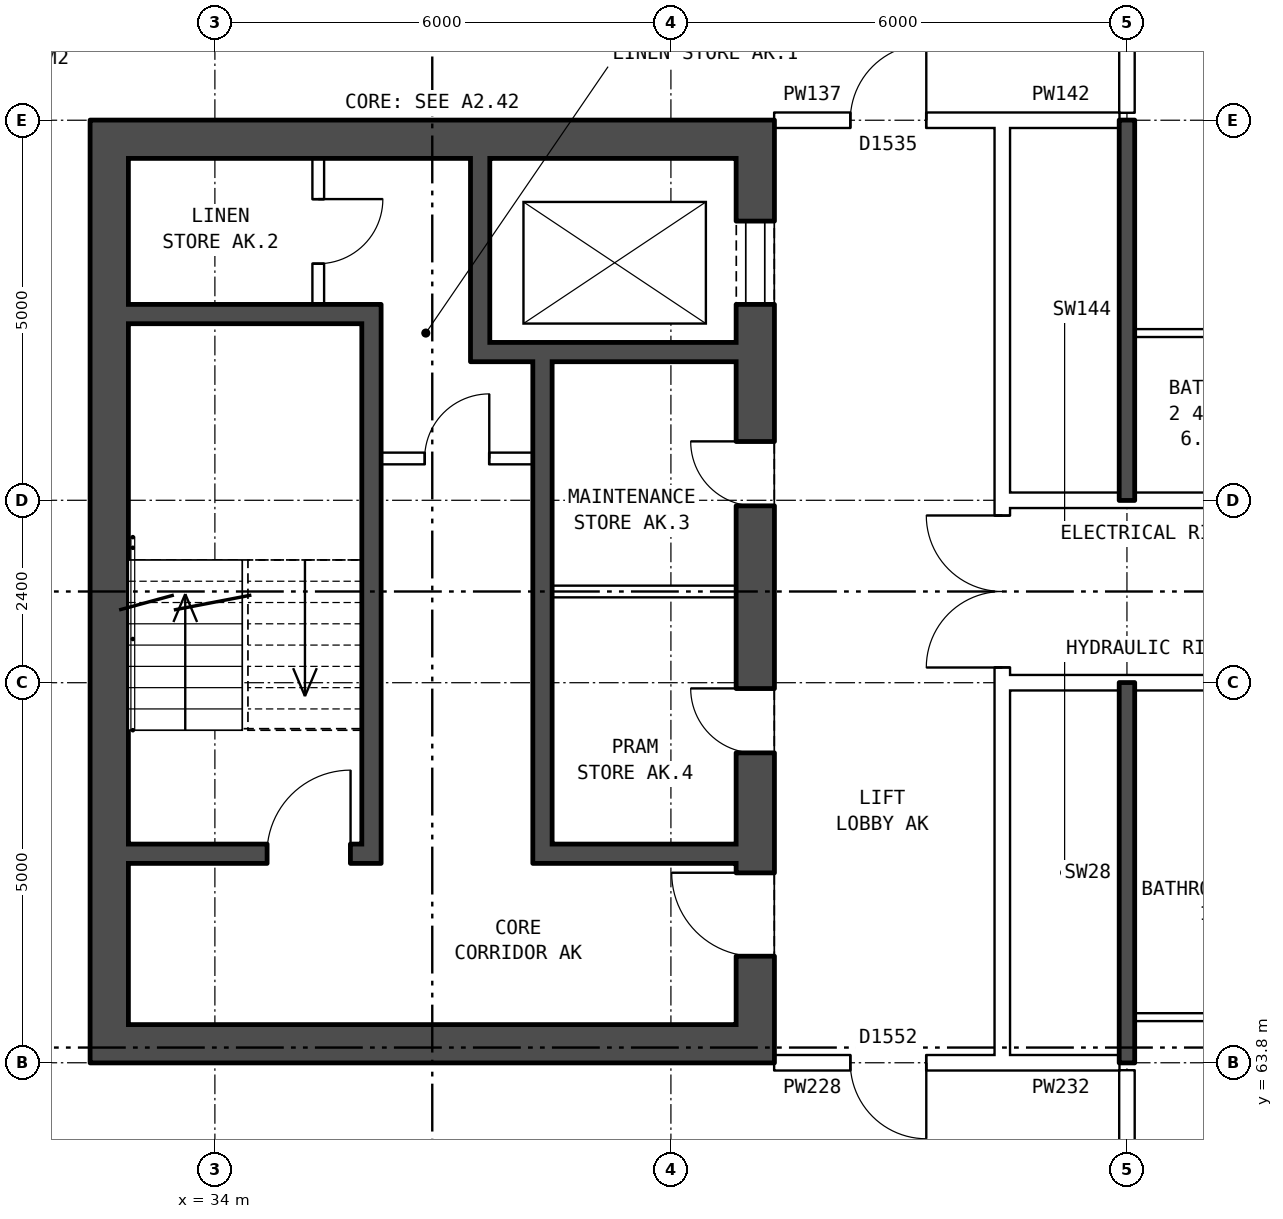
"""IFC4 building model, lengths in metres.
Left out: names, types, materials, properties, quantities, classifications, styles, units other than length and angle.
Written with IfcOpenShell. Run it as: python <this file> out.ifc"""

import sys

from ifc_helpers import new_model, si_unit, direction, frame, frame_2d, origin, place, context, subcontext, project, spatial, rectangle, extrude, element, fill, save


model = new_model("IFC4")
c1 = context("Model", 3, precision=1e-05, world=origin(), true_north=direction((0.0, 1.0)))
c2 = subcontext(c1, "Body", "Model", "MODEL_VIEW")
j1 = project(units=[si_unit("LENGTHUNIT", "METRE"), si_unit("PLANEANGLEUNIT", "RADIAN")], contexts=[c1])
p1 = place(None, origin())
s1 = spatial("IfcSite", under=j1, at=p1, CompositionType="ELEMENT")
p2 = place(p1, origin())
s2 = spatial("IfcBuilding", under=s1, at=p2, CompositionType="ELEMENT")
p3 = place(p2, frame((0.0, 0.0, 148.5)))
s3 = spatial("IfcBuildingStorey", under=s2, at=p3, CompositionType="ELEMENT", Elevation=148.5)
p4 = place(p3, frame((41.11, 76.2, 0.0), z_axis=(0.0, 0.0, 1.0), x_axis=(0.0, -1.0, 0.0)))
e1 = element("IfcWall", 1, at=p4, inside=s3, PredefinedType="SHEAR", context=c2, shape_type="SweptSolid", body=[
    extrude(rectangle(XDim=12.4, YDim=0.5, at=frame_2d((6.2, 0.0))), origin(), (0.0, 0.0, 1.0), 2.85),
])
p5 = place(p4, frame((1.325, 0.0, 0.0)))
e2 = element("IfcOpeningElement", 2, at=p5, cuts=e1, PredefinedType="OPENING", context=c2, shape_type="SweptSolid", body=[
    extrude(rectangle(XDim=1.1, YDim=2.1, at=frame_2d((0.55, 1.05))), frame((0.0, 0.26, 0.0), z_axis=(0.0, -1.0, 0.0), x_axis=(1.0, 0.0, 0.0)), (0.0, 0.0, 1.0), 0.52),
])
p6 = place(p4, frame((4.225, 0.0, 0.0)))
e3 = element("IfcOpeningElement", 3, at=p6, cuts=e1, PredefinedType="OPENING", context=c2, shape_type="SweptSolid", body=[
    extrude(rectangle(XDim=0.85, YDim=2.1, at=frame_2d((0.425, 1.05))), frame((0.0, 0.26, 0.0), z_axis=(0.0, -1.0, 0.0), x_axis=(1.0, 0.0, 0.0)), (0.0, 0.0, 1.0), 0.52),
])
p7 = place(p4, frame((7.475, 0.0, 0.0)))
e4 = element("IfcOpeningElement", 4, at=p7, cuts=e1, PredefinedType="OPENING", context=c2, shape_type="SweptSolid", body=[
    extrude(rectangle(XDim=0.85, YDim=2.1, at=frame_2d((0.425, 1.05))), frame((0.0, 0.26, 0.0), z_axis=(0.0, -1.0, 0.0), x_axis=(1.0, 0.0, 0.0)), (0.0, 0.0, 1.0), 0.52),
])
p8 = place(p4, frame((9.9, 0.0, 0.0)))
e5 = element("IfcOpeningElement", 5, at=p8, cuts=e1, PredefinedType="OPENING", context=c2, shape_type="SweptSolid", body=[
    extrude(rectangle(XDim=1.1, YDim=2.1, at=frame_2d((0.55, 1.05))), frame((0.0, 0.26, 0.0), z_axis=(0.0, -1.0, 0.0), x_axis=(1.0, 0.0, 0.0)), (0.0, 0.0, 1.0), 0.52),
])
p9 = place(p3, frame((32.61, 76.2, 0.0), z_axis=(0.0, 0.0, 1.0), x_axis=(0.0, -1.0, 0.0)))
e6 = element("IfcWall", 6, at=p9, inside=s3, PredefinedType="SHEAR", context=c2, shape_type="SweptSolid", body=[
    extrude(rectangle(XDim=12.4, YDim=0.5, at=frame_2d((6.2, 0.0))), origin(), (0.0, 0.0, 1.0), 2.85),
])
for number, where, z_axis, x_axis in (
    (7, (40.86, 75.95, 0.0), (0.0, 0.0, 1.0), (-1.0, 0.0, 0.0)),
    (8, (40.86, 64.05, 0.0), (0.0, 0.0, 1.0), (-1.0, 0.0, 0.0)),
):
    element("IfcWall", number, at=place(p3, frame(where, z_axis=z_axis, x_axis=x_axis)), inside=s3, PredefinedType="SHEAR", context=c2, shape_type="SweptSolid", body=[
        extrude(rectangle(XDim=8.0, YDim=0.5, at=frame_2d((4.0, 0.0))), origin(), (0.0, 0.0, 1.0), 2.85),
    ])
p10 = place(p3, frame((35.935, 73.65, 0.0), z_axis=(0.0, 0.0, 1.0), x_axis=(-1.0, 0.0, 0.0)))
e9 = element("IfcWall", 9, at=p10, inside=s3, PredefinedType="SHEAR", context=c2, shape_type="SweptSolid", body=[
    extrude(rectangle(XDim=3.075, YDim=0.25, at=frame_2d((1.538, 0.0))), origin(), (0.0, 0.0, 1.0), 2.85),
])
p11 = place(p3, frame((40.86, 73.15, 0.0), z_axis=(0.0, 0.0, 1.0), x_axis=(-1.0, 0.0, 0.0)))
e10 = element("IfcWall", 10, at=p11, inside=s3, PredefinedType="SHEAR", context=c2, shape_type="SweptSolid", body=[
    extrude(rectangle(XDim=3.495, YDim=0.25, at=frame_2d((1.748, 0.0))), origin(), (0.0, 0.0, 1.0), 2.85),
])
p12 = place(p3, frame((38.185, 71.75, 0.0), z_axis=(0.0, 0.0, 1.0), x_axis=(-1.0, 0.0, 0.0)))
e11 = element("IfcWall", 11, at=p12, inside=s3, PredefinedType="PARTITIONING", context=c2, shape_type="SweptSolid", body=[
    extrude(rectangle(XDim=2.0, YDim=0.15, at=frame_2d((1.0, 0.0))), origin(), (0.0, 0.0, 1.0), 2.85),
])
p13 = place(p12, frame((0.575, 0.0, 0.0)))
e12 = element("IfcOpeningElement", 12, at=p13, cuts=e11, PredefinedType="OPENING", context=c2, shape_type="SweptSolid", body=[
    extrude(rectangle(XDim=0.85, YDim=2.1, at=frame_2d((0.425, 1.05))), frame((0.0, 0.085, 0.0), z_axis=(0.0, -1.0, 0.0), x_axis=(1.0, 0.0, 0.0)), (0.0, 0.0, 1.0), 0.17),
])
p14 = place(p3, frame((40.86, 70.0, 0.0), z_axis=(0.0, 0.0, 1.0), x_axis=(-1.0, 0.0, 0.0)))
e13 = element("IfcWall", 13, at=p14, inside=s3, PredefinedType="PARTITIONING", context=c2, shape_type="SweptSolid", body=[
    extrude(rectangle(XDim=2.425, YDim=0.15, at=frame_2d((1.212, 0.0))), origin(), (0.0, 0.0, 1.0), 2.85),
])
p15 = place(p3, frame((40.86, 66.55, 0.0), z_axis=(0.0, 0.0, 1.0), x_axis=(-1.0, 0.0, 0.0)))
e14 = element("IfcWall", 14, at=p15, inside=s3, PredefinedType="SHEAR", context=c2, shape_type="SweptSolid", body=[
    extrude(rectangle(XDim=2.425, YDim=0.25, at=frame_2d((1.212, 0.0))), origin(), (0.0, 0.0, 1.0), 2.85),
])
p16 = place(p3, frame((35.935, 66.55, 0.0), z_axis=(0.0, 0.0, 1.0), x_axis=(-1.0, 0.0, 0.0)))
e15 = element("IfcWall", 15, at=p16, inside=s3, PredefinedType="SHEAR", context=c2, shape_type="SweptSolid", body=[
    extrude(rectangle(XDim=3.075, YDim=0.25, at=frame_2d((1.538, 0.0))), origin(), (0.0, 0.0, 1.0), 2.85),
])
p17 = place(p16, frame((0.15, 0.0, 0.0)))
e16 = element("IfcOpeningElement", 16, at=p17, cuts=e15, PredefinedType="OPENING", context=c2, shape_type="SweptSolid", body=[
    extrude(rectangle(XDim=1.1, YDim=2.1, at=frame_2d((0.55, 1.05))), frame((0.0, 0.135, 0.0), z_axis=(0.0, -1.0, 0.0), x_axis=(1.0, 0.0, 0.0)), (0.0, 0.0, 1.0), 0.27),
])
p18 = place(p3, frame((38.31, 73.025, 0.0), z_axis=(0.0, 0.0, 1.0), x_axis=(0.0, -1.0, 0.0)))
e17 = element("IfcWall", 17, at=p18, inside=s3, PredefinedType="SHEAR", context=c2, shape_type="SweptSolid", body=[
    extrude(rectangle(XDim=6.6, YDim=0.25, at=frame_2d((3.3, 0.0))), origin(), (0.0, 0.0, 1.0), 2.85),
])
p19 = place(p3, frame((37.49, 75.7, 0.0), z_axis=(0.0, 0.0, 1.0), x_axis=(0.0, -1.0, 0.0)))
e18 = element("IfcWall", 18, at=p19, inside=s3, PredefinedType="SHEAR", context=c2, shape_type="SweptSolid", body=[
    extrude(rectangle(XDim=2.425, YDim=0.25, at=frame_2d((1.212, 0.0))), origin(), (0.0, 0.0, 1.0), 2.85),
])
p20 = place(p3, frame((36.06, 73.775, 0.0), z_axis=(0.0, 0.0, 1.0), x_axis=(0.0, -1.0, 0.0)))
e19 = element("IfcWall", 19, at=p20, inside=s3, PredefinedType="SHEAR", context=c2, shape_type="SweptSolid", body=[
    extrude(rectangle(XDim=7.35, YDim=0.25, at=frame_2d((3.675, 0.0))), origin(), (0.0, 0.0, 1.0), 2.85),
])
p21 = place(p3, frame((35.36, 75.7, 0.0), z_axis=(0.0, 0.0, 1.0), x_axis=(0.0, -1.0, 0.0)))
e20 = element("IfcWall", 20, at=p21, inside=s3, PredefinedType="PARTITIONING", context=c2, shape_type="SweptSolid", body=[
    extrude(rectangle(XDim=1.925, YDim=0.15, at=frame_2d((0.962, 0.0))), origin(), (0.0, 0.0, 1.0), 2.85),
])
p22 = place(p21, frame((0.538, 0.0, 0.0)))
e21 = element("IfcOpeningElement", 21, at=p22, cuts=e20, PredefinedType="OPENING", context=c2, shape_type="SweptSolid", body=[
    extrude(rectangle(XDim=0.85, YDim=2.1, at=frame_2d((0.425, 1.05))), frame((0.0, 0.085, 0.0), z_axis=(0.0, -1.0, 0.0), x_axis=(1.0, 0.0, 0.0)), (0.0, 0.0, 1.0), 0.17),
])
p23 = place(p3, frame((44.36, 63.9, 0.0), z_axis=(0.0, 0.0, 1.0), x_axis=(0.0, 1.0, 0.0)))
e22 = element("IfcWall", 22, at=p23, inside=s3, PredefinedType="PARTITIONING", context=c2, shape_type="SweptSolid", body=[
    extrude(rectangle(XDim=12.2, YDim=0.2, at=frame_2d((6.1, 0.0))), origin(), (0.0, 0.0, 1.0), 2.85),
])
p24 = place(p23, frame((5.1, 0.0, 0.0)))
e23 = element("IfcOpeningElement", 23, at=p24, cuts=e22, PredefinedType="OPENING", context=c2, shape_type="SweptSolid", body=[
    extrude(rectangle(XDim=2.0, YDim=2.1, at=frame_2d((1.0, 1.05))), frame((0.0, 0.11, 0.0), z_axis=(0.0, -1.0, 0.0), x_axis=(1.0, 0.0, 0.0)), (0.0, 0.0, 1.0), 0.22),
])
p25 = place(p3, frame((41.36, 63.8, 0.0), z_axis=(0.0, 0.0, 1.0), x_axis=(1.0, 0.0, 0.0)))
e24 = element("IfcWall", 24, at=p25, inside=s3, PredefinedType="PARTITIONING", context=c2, shape_type="SweptSolid", body=[
    extrude(rectangle(XDim=3.0, YDim=0.2, at=frame_2d((1.5, 0.0))), origin(), (0.0, 0.0, 1.0), 2.85),
])
p26 = place(p25, frame((1.0, 0.0, 0.0)))
e25 = element("IfcOpeningElement", 25, at=p26, cuts=e24, PredefinedType="OPENING", context=c2, shape_type="SweptSolid", body=[
    extrude(rectangle(XDim=1.0, YDim=2.1, at=frame_2d((0.5, 1.05))), frame((0.0, 0.11, 0.0), z_axis=(0.0, -1.0, 0.0), x_axis=(1.0, 0.0, 0.0)), (0.0, 0.0, 1.0), 0.22),
])
p27 = place(p3, frame((44.36, 63.8, 0.0), z_axis=(0.0, 0.0, 1.0), x_axis=(1.0, 0.0, 0.0)))
e26 = element("IfcWall", 26, at=p27, inside=s3, PredefinedType="PARTITIONING", context=c2, shape_type="SweptSolid", body=[
    extrude(rectangle(XDim=1.54, YDim=0.2, at=frame_2d((0.77, 0.0))), origin(), (0.0, 0.0, 1.0), 2.85),
])
p28 = place(p3, frame((46.1, 64.4, 0.0), z_axis=(0.0, 0.0, 1.0), x_axis=(1.0, 0.0, 0.0)))
e27 = element("IfcWall", 27, at=p28, inside=s3, PredefinedType="PARTITIONING", context=c2, shape_type="SweptSolid", body=[
    extrude(rectangle(XDim=2.9, YDim=0.1, at=frame_2d((1.45, 0.0))), origin(), (0.0, 0.0, 1.0), 2.85),
])
p29 = place(p3, frame((44.36, 68.8, 0.0), z_axis=(0.0, 0.0, 1.0), x_axis=(1.0, 0.0, 0.0)))
e28 = element("IfcWall", 28, at=p29, inside=s3, PredefinedType="PARTITIONING", context=c2, shape_type="SweptSolid", body=[
    extrude(rectangle(XDim=19.28, YDim=0.2, at=frame_2d((9.64, 0.0))), origin(), (0.0, 0.0, 1.0), 2.85),
])
p30 = place(p29, frame((14.64, 0.0, 0.0)))
e29 = element("IfcOpeningElement", 29, at=p30, cuts=e28, PredefinedType="OPENING", context=c2, shape_type="SweptSolid", body=[
    extrude(rectangle(XDim=1.0, YDim=2.1, at=frame_2d((0.5, 1.05))), frame((0.0, 0.11, 0.0), z_axis=(0.0, -1.0, 0.0), x_axis=(1.0, 0.0, 0.0)), (0.0, 0.0, 1.0), 0.22),
])
p31 = place(p29, frame((5.64, 0.0, 0.0)))
e30 = element("IfcOpeningElement", 30, at=p31, cuts=e28, PredefinedType="OPENING", context=c2, shape_type="SweptSolid", body=[
    extrude(rectangle(XDim=1.0, YDim=2.1, at=frame_2d((0.5, 1.05))), frame((0.0, 0.11, 0.0), z_axis=(0.0, -1.0, 0.0), x_axis=(1.0, 0.0, 0.0)), (0.0, 0.0, 1.0), 0.22),
])
p32 = place(p3, frame((44.36, 71.2, 0.0), z_axis=(0.0, 0.0, 1.0), x_axis=(1.0, 0.0, 0.0)))
e31 = element("IfcWall", 31, at=p32, inside=s3, PredefinedType="PARTITIONING", context=c2, shape_type="SweptSolid", body=[
    extrude(rectangle(XDim=19.28, YDim=0.2, at=frame_2d((9.64, 0.0))), origin(), (0.0, 0.0, 1.0), 2.85),
])
p33 = place(p32, frame((14.64, 0.0, 0.0)))
e32 = element("IfcOpeningElement", 32, at=p33, cuts=e31, PredefinedType="OPENING", context=c2, shape_type="SweptSolid", body=[
    extrude(rectangle(XDim=1.0, YDim=2.1, at=frame_2d((0.5, 1.05))), frame((0.0, 0.11, 0.0), z_axis=(0.0, -1.0, 0.0), x_axis=(1.0, 0.0, 0.0)), (0.0, 0.0, 1.0), 0.22),
])
p34 = place(p32, frame((5.64, 0.0, 0.0)))
e33 = element("IfcOpeningElement", 33, at=p34, cuts=e31, PredefinedType="OPENING", context=c2, shape_type="SweptSolid", body=[
    extrude(rectangle(XDim=1.0, YDim=2.1, at=frame_2d((0.5, 1.05))), frame((0.0, 0.11, 0.0), z_axis=(0.0, -1.0, 0.0), x_axis=(1.0, 0.0, 0.0)), (0.0, 0.0, 1.0), 0.22),
])
p35 = place(p3, frame((46.1, 73.4, 0.0), z_axis=(0.0, 0.0, 1.0), x_axis=(1.0, 0.0, 0.0)))
e34 = element("IfcWall", 34, at=p35, inside=s3, PredefinedType="PARTITIONING", context=c2, shape_type="SweptSolid", body=[
    extrude(rectangle(XDim=2.9, YDim=0.1, at=frame_2d((1.45, 0.0))), origin(), (0.0, 0.0, 1.0), 2.85),
])
p36 = place(p3, frame((41.36, 76.2, 0.0), z_axis=(0.0, 0.0, 1.0), x_axis=(1.0, 0.0, 0.0)))
e35 = element("IfcWall", 35, at=p36, inside=s3, PredefinedType="PARTITIONING", context=c2, shape_type="SweptSolid", body=[
    extrude(rectangle(XDim=3.0, YDim=0.2, at=frame_2d((1.5, 0.0))), origin(), (0.0, 0.0, 1.0), 2.85),
])
p37 = place(p36, frame((1.0, 0.0, 0.0)))
e36 = element("IfcOpeningElement", 36, at=p37, cuts=e35, PredefinedType="OPENING", context=c2, shape_type="SweptSolid", body=[
    extrude(rectangle(XDim=1.0, YDim=2.1, at=frame_2d((0.5, 1.05))), frame((0.0, 0.11, 0.0), z_axis=(0.0, -1.0, 0.0), x_axis=(1.0, 0.0, 0.0)), (0.0, 0.0, 1.0), 0.22),
])
p38 = place(p3, frame((44.36, 76.2, 0.0), z_axis=(0.0, 0.0, 1.0), x_axis=(1.0, 0.0, 0.0)))
e37 = element("IfcWall", 37, at=p38, inside=s3, PredefinedType="PARTITIONING", context=c2, shape_type="SweptSolid", body=[
    extrude(rectangle(XDim=1.54, YDim=0.2, at=frame_2d((0.77, 0.0))), origin(), (0.0, 0.0, 1.0), 2.85),
])
p39 = place(p3, frame((46.0, 61.5, 0.0), z_axis=(0.0, 0.0, 1.0), x_axis=(0.0, 1.0, 0.0)))
e38 = element("IfcWall", 38, at=p39, inside=s3, PredefinedType="PARTITIONING", context=c2, shape_type="SweptSolid", body=[
    extrude(rectangle(XDim=2.2, YDim=0.2, at=frame_2d((1.1, 0.0))), origin(), (0.0, 0.0, 1.0), 2.85),
])
for number, where, z_axis, x_axis in (
    (39, (46.0, 63.8, 0.0), (0.0, 0.0, 1.0), (0.0, 1.0, 0.0)),
    (40, (46.0, 71.2, 0.0), (0.0, 0.0, 1.0), (0.0, 1.0, 0.0)),
):
    element("IfcWall", number, at=place(p3, frame(where, z_axis=z_axis, x_axis=x_axis)), inside=s3, PredefinedType="SOLIDWALL", context=c2, shape_type="SweptSolid", body=[
        extrude(rectangle(XDim=5.0, YDim=0.2, at=frame_2d((2.5, 0.0))), origin(), (0.0, 0.0, 1.0), 2.85),
    ])
p40 = place(p3, frame((46.0, 76.3, 0.0), z_axis=(0.0, 0.0, 1.0), x_axis=(0.0, 1.0, 0.0)))
e41 = element("IfcWall", 41, at=p40, inside=s3, PredefinedType="PARTITIONING", context=c2, shape_type="SweptSolid", body=[
    extrude(rectangle(XDim=2.2, YDim=0.2, at=frame_2d((1.1, 0.0))), origin(), (0.0, 0.0, 1.0), 2.85),
])
p41 = place(p5, origin())
e42 = element("IfcDoor", 42, at=p41, inside=s3, OperationType="DOUBLE_DOOR_SLIDING", PredefinedType="DOOR", context=c2, shape_type="SweptSolid", body=[
    extrude(rectangle(XDim=1.1, YDim=2.1, at=frame_2d((0.55, 1.05))), frame((0.0, -0.185, 0.0), z_axis=(0.0, -1.0, 0.0), x_axis=(1.0, 0.0, 0.0)), (0.0, 0.0, 1.0), 0.05),
])
fill(e2, e42)
p42 = place(p6, frame((0.85, 0.0, 0.0), z_axis=(0.0, 0.0, 1.0), x_axis=(-1.0, 0.0, 0.0)))
e43 = element("IfcDoor", 43, at=p42, inside=s3, OperationType="SINGLE_SWING_RIGHT", PredefinedType="DOOR", context=c2, shape_type="SweptSolid", body=[
    extrude(rectangle(XDim=0.85, YDim=2.1, at=frame_2d((0.425, 1.05))), frame((0.0, 0.235, 0.0), z_axis=(0.0, -1.0, 0.0), x_axis=(1.0, 0.0, 0.0)), (0.0, 0.0, 1.0), 0.05),
])
fill(e3, e43)
p43 = place(p7, frame((0.85, 0.0, 0.0), z_axis=(0.0, 0.0, 1.0), x_axis=(-1.0, 0.0, 0.0)))
e44 = element("IfcDoor", 44, at=p43, inside=s3, OperationType="SINGLE_SWING_RIGHT", PredefinedType="DOOR", context=c2, shape_type="SweptSolid", body=[
    extrude(rectangle(XDim=0.85, YDim=2.1, at=frame_2d((0.425, 1.05))), frame((0.0, 0.235, 0.0), z_axis=(0.0, -1.0, 0.0), x_axis=(1.0, 0.0, 0.0)), (0.0, 0.0, 1.0), 0.05),
])
fill(e4, e44)
p44 = place(p8, frame((1.1, 0.0, 0.0), z_axis=(0.0, 0.0, 1.0), x_axis=(-1.0, 0.0, 0.0)))
e45 = element("IfcDoor", 45, at=p44, inside=s3, OperationType="SINGLE_SWING_RIGHT", PredefinedType="DOOR", context=c2, shape_type="SweptSolid", body=[
    extrude(rectangle(XDim=1.1, YDim=2.1, at=frame_2d((0.55, 1.05))), frame((0.0, 0.235, 0.0), z_axis=(0.0, -1.0, 0.0), x_axis=(1.0, 0.0, 0.0)), (0.0, 0.0, 1.0), 0.05),
])
fill(e5, e45)
p45 = place(p17, frame((1.1, 0.0, 0.0), z_axis=(0.0, 0.0, 1.0), x_axis=(-1.0, 0.0, 0.0)))
e46 = element("IfcDoor", 46, at=p45, inside=s3, OperationType="SINGLE_SWING_RIGHT", PredefinedType="DOOR", context=c2, shape_type="SweptSolid", body=[
    extrude(rectangle(XDim=1.1, YDim=2.1, at=frame_2d((0.55, 1.05))), frame((0.0, 0.025, 0.0), z_axis=(0.0, -1.0, 0.0), x_axis=(1.0, 0.0, 0.0)), (0.0, 0.0, 1.0), 0.05),
])
fill(e16, e46)
p46 = place(p13, frame((0.85, 0.0, 0.0), z_axis=(0.0, 0.0, 1.0), x_axis=(-1.0, 0.0, 0.0)))
e47 = element("IfcDoor", 47, at=p46, inside=s3, OperationType="SINGLE_SWING_RIGHT", PredefinedType="DOOR", context=c2, shape_type="SweptSolid", body=[
    extrude(rectangle(XDim=0.85, YDim=2.1, at=frame_2d((0.425, 1.05))), frame((0.0, 0.025, 0.0), z_axis=(0.0, -1.0, 0.0), x_axis=(1.0, 0.0, 0.0)), (0.0, 0.0, 1.0), 0.05),
])
fill(e12, e47)
p47 = place(p22, origin())
e48 = element("IfcDoor", 48, at=p47, inside=s3, OperationType="SINGLE_SWING_LEFT", PredefinedType="DOOR", context=c2, shape_type="SweptSolid", body=[
    extrude(rectangle(XDim=0.85, YDim=2.1, at=frame_2d((0.425, 1.05))), frame((0.0, 0.025, 0.0), z_axis=(0.0, -1.0, 0.0), x_axis=(1.0, 0.0, 0.0)), (0.0, 0.0, 1.0), 0.05),
])
fill(e21, e48)
p48 = place(p24, origin())
e49 = element("IfcDoor", 49, at=p48, inside=s3, OperationType="DOUBLE_DOOR_SINGLE_SWING", PredefinedType="DOOR", context=c2, shape_type="SweptSolid", body=[
    extrude(rectangle(XDim=2.0, YDim=2.1, at=frame_2d((1.0, 1.05))), frame((0.0, 0.025, 0.0), z_axis=(0.0, -1.0, 0.0), x_axis=(1.0, 0.0, 0.0)), (0.0, 0.0, 1.0), 0.05),
])
fill(e23, e49)
p49 = place(p26, frame((1.0, 0.0, 0.0), z_axis=(0.0, 0.0, 1.0), x_axis=(-1.0, 0.0, 0.0)))
e50 = element("IfcDoor", 50, at=p49, inside=s3, OperationType="SINGLE_SWING_LEFT", PredefinedType="DOOR", context=c2, shape_type="SweptSolid", body=[
    extrude(rectangle(XDim=1.0, YDim=2.1, at=frame_2d((0.5, 1.05))), frame((0.0, 0.025, 0.0), z_axis=(0.0, -1.0, 0.0), x_axis=(1.0, 0.0, 0.0)), (0.0, 0.0, 1.0), 0.05),
])
fill(e25, e50)
p50 = place(p37, origin())
e51 = element("IfcDoor", 51, at=p50, inside=s3, OperationType="SINGLE_SWING_RIGHT", PredefinedType="DOOR", context=c2, shape_type="SweptSolid", body=[
    extrude(rectangle(XDim=1.0, YDim=2.1, at=frame_2d((0.5, 1.05))), frame((0.0, 0.025, 0.0), z_axis=(0.0, -1.0, 0.0), x_axis=(1.0, 0.0, 0.0)), (0.0, 0.0, 1.0), 0.05),
])
fill(e36, e51)
save(model, sys.argv[1])
